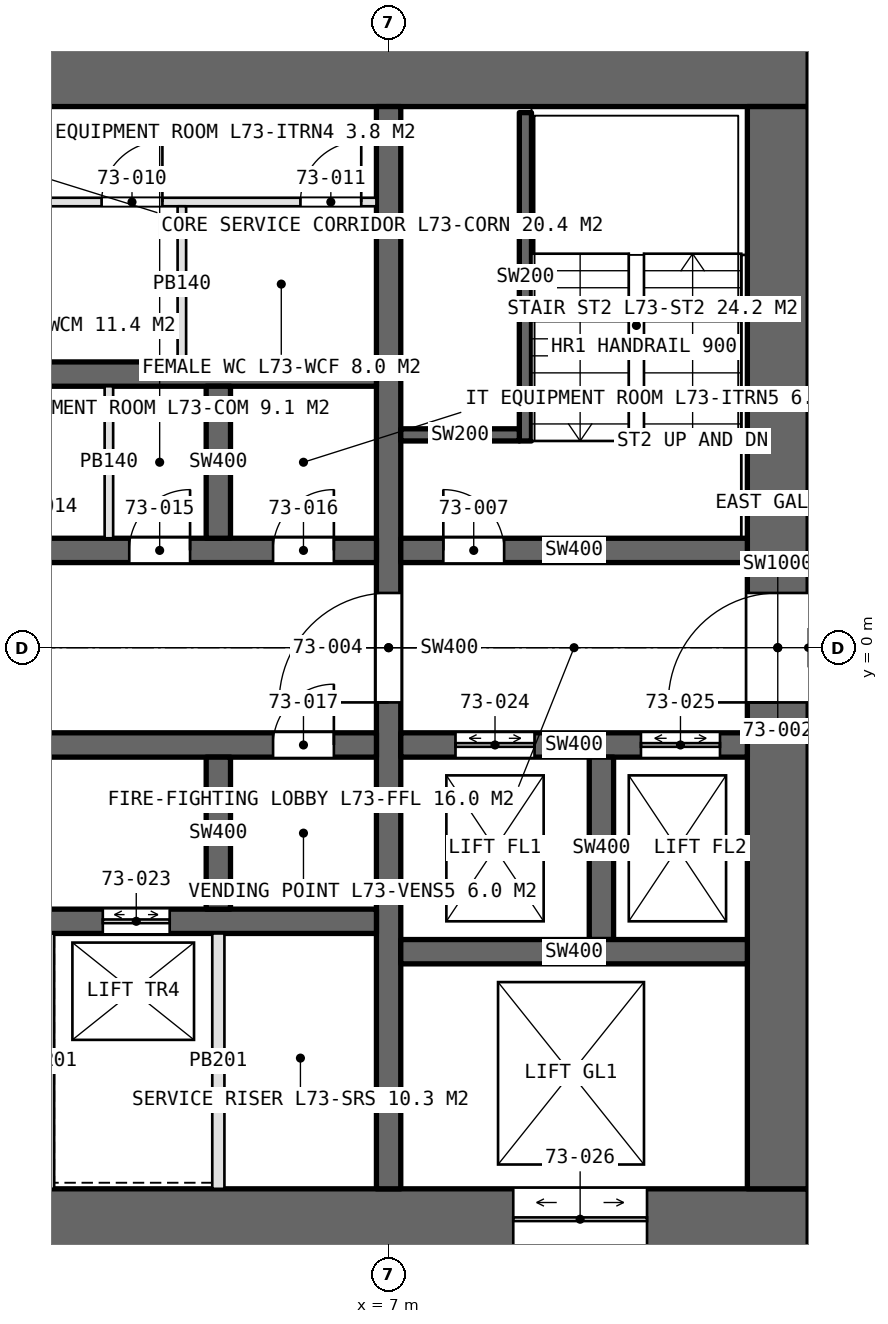
"""IFC4 building model, lengths in metres.
Left out: names, types, materials, properties, quantities, classifications, styles, units other than length and angle.
Written with IfcOpenShell. Run it as: python <this file> out.ifc"""

import sys

from ifc_helpers import new_model, si_unit, direction, frame, frame_2d, origin, place, context, subcontext, project, spatial, rectangle, extrude, element, fill, save


model = new_model("IFC4")
c1 = context("Model", 3, precision=1e-05, world=origin(), true_north=direction((0.0, 1.0)))
c2 = subcontext(c1, "Body", "Model", "MODEL_VIEW")
j1 = project(units=[si_unit("LENGTHUNIT", "METRE"), si_unit("PLANEANGLEUNIT", "RADIAN")], contexts=[c1])
p1 = place(None, origin())
s1 = spatial("IfcSite", under=j1, at=p1, CompositionType="ELEMENT")
p2 = place(p1, origin())
s2 = spatial("IfcBuilding", under=s1, at=p2, CompositionType="ELEMENT")
p3 = place(p2, frame((0.0, 0.0, 325.8)))
s3 = spatial("IfcBuildingStorey", under=s2, at=p3, CompositionType="ELEMENT", Elevation=325.8)
p4 = place(p3, frame((-13.9, -9.4, 0.0), z_axis=(0.0, 0.0, 1.0), x_axis=(1.0, 0.0, 0.0)))
e1 = element("IfcWall", 1, at=p4, inside=s3, PredefinedType="SHEAR", context=c2, shape_type="SweptSolid", body=[
    extrude(rectangle(XDim=27.8, YDim=1.0, at=frame_2d((13.9, 0.0))), origin(), (0.0, 0.0, 1.0), 4.2),
])
p5 = place(p4, frame((22.95, 0.0, 0.0)))
e2 = element("IfcOpeningElement", 2, at=p5, cuts=e1, PredefinedType="OPENING", context=c2, shape_type="SweptSolid", body=[
    extrude(rectangle(XDim=2.2, YDim=2.7, at=frame_2d((1.1, 1.35))), frame((0.0, 0.51, 0.0), z_axis=(0.0, -1.0, 0.0), x_axis=(1.0, 0.0, 0.0)), (0.0, 0.0, 1.0), 1.02),
])
p6 = place(p3, frame((13.9, 9.4, 0.0), z_axis=(0.0, 0.0, 1.0), x_axis=(-1.0, 0.0, 0.0)))
e3 = element("IfcWall", 3, at=p6, inside=s3, PredefinedType="SHEAR", context=c2, shape_type="SweptSolid", body=[
    extrude(rectangle(XDim=27.8, YDim=1.0, at=frame_2d((13.9, 0.0))), origin(), (0.0, 0.0, 1.0), 4.2),
])
p7 = place(p6, frame((23.9, 0.0, 0.0)))
e4 = element("IfcOpeningElement", 4, at=p7, cuts=e3, PredefinedType="OPENING", context=c2, shape_type="SweptSolid", body=[
    extrude(rectangle(XDim=1.0, YDim=2.4, at=frame_2d((0.5, 1.2))), frame((0.0, 0.51, 0.0), z_axis=(0.0, -1.0, 0.0), x_axis=(1.0, 0.0, 0.0)), (0.0, 0.0, 1.0), 1.02),
])
p8 = place(p6, frame((13.0, 0.0, 0.0)))
e5 = element("IfcOpeningElement", 5, at=p8, cuts=e3, PredefinedType="OPENING", context=c2, shape_type="SweptSolid", body=[
    extrude(rectangle(XDim=1.8, YDim=2.4, at=frame_2d((0.9, 1.2))), frame((0.0, 0.51, 0.0), z_axis=(0.0, -1.0, 0.0), x_axis=(1.0, 0.0, 0.0)), (0.0, 0.0, 1.0), 1.02),
])
p9 = place(p3, frame((13.4, -8.9, 0.0), z_axis=(0.0, 0.0, 1.0), x_axis=(0.0, 1.0, 0.0)))
e6 = element("IfcWall", 6, at=p9, inside=s3, PredefinedType="SHEAR", context=c2, shape_type="SweptSolid", body=[
    extrude(rectangle(XDim=17.8, YDim=1.0, at=frame_2d((8.9, 0.0))), origin(), (0.0, 0.0, 1.0), 4.2),
])
p10 = place(p9, frame((8.0, 0.0, 0.0)))
e7 = element("IfcOpeningElement", 7, at=p10, cuts=e6, PredefinedType="OPENING", context=c2, shape_type="SweptSolid", body=[
    extrude(rectangle(XDim=1.8, YDim=2.4, at=frame_2d((0.9, 1.2))), frame((0.0, 0.51, 0.0), z_axis=(0.0, -1.0, 0.0), x_axis=(1.0, 0.0, 0.0)), (0.0, 0.0, 1.0), 1.02),
])
p11 = place(p3, frame((7.0, -8.9, 0.0), z_axis=(0.0, 0.0, 1.0), x_axis=(0.0, 1.0, 0.0)))
e8 = element("IfcWall", 8, at=p11, inside=s3, PredefinedType="SHEAR", context=c2, shape_type="SweptSolid", body=[
    extrude(rectangle(XDim=17.8, YDim=0.4, at=frame_2d((8.9, 0.0))), origin(), (0.0, 0.0, 1.0), 4.2),
])
p12 = place(p11, frame((8.0, 0.0, 0.0)))
e9 = element("IfcOpeningElement", 9, at=p12, cuts=e8, PredefinedType="OPENING", context=c2, shape_type="SweptSolid", body=[
    extrude(rectangle(XDim=1.8, YDim=2.4, at=frame_2d((0.9, 1.2))), frame((0.0, 0.21, 0.0), z_axis=(0.0, -1.0, 0.0), x_axis=(1.0, 0.0, 0.0)), (0.0, 0.0, 1.0), 0.42),
])
p13 = place(p3, frame((-6.8, 1.6, 0.0), z_axis=(0.0, 0.0, 1.0), x_axis=(1.0, 0.0, 0.0)))
e10 = element("IfcWall", 10, at=p13, inside=s3, PredefinedType="SHEAR", context=c2, shape_type="SweptSolid", body=[
    extrude(rectangle(XDim=13.6, YDim=0.4, at=frame_2d((6.8, 0.0))), origin(), (0.0, 0.0, 1.0), 4.2),
])
p14 = place(p13, frame((0.365, 0.0, 0.0)))
e11 = element("IfcOpeningElement", 11, at=p14, cuts=e10, PredefinedType="OPENING", context=c2, shape_type="SweptSolid", body=[
    extrude(rectangle(XDim=1.0, YDim=2.4, at=frame_2d((0.5, 1.2))), frame((0.0, 0.21, 0.0), z_axis=(0.0, -1.0, 0.0), x_axis=(1.0, 0.0, 0.0)), (0.0, 0.0, 1.0), 0.42),
])
p15 = place(p13, frame((3.2, 0.0, 0.0)))
e12 = element("IfcOpeningElement", 12, at=p15, cuts=e10, PredefinedType="OPENING", context=c2, shape_type="SweptSolid", body=[
    extrude(rectangle(XDim=1.0, YDim=2.4, at=frame_2d((0.5, 1.2))), frame((0.0, 0.21, 0.0), z_axis=(0.0, -1.0, 0.0), x_axis=(1.0, 0.0, 0.0)), (0.0, 0.0, 1.0), 0.42),
])
p16 = place(p13, frame((6.9, 0.0, 0.0)))
e13 = element("IfcOpeningElement", 13, at=p16, cuts=e10, PredefinedType="OPENING", context=c2, shape_type="SweptSolid", body=[
    extrude(rectangle(XDim=1.0, YDim=2.4, at=frame_2d((0.5, 1.2))), frame((0.0, 0.21, 0.0), z_axis=(0.0, -1.0, 0.0), x_axis=(1.0, 0.0, 0.0)), (0.0, 0.0, 1.0), 0.42),
])
p17 = place(p13, frame((9.535, 0.0, 0.0)))
e14 = element("IfcOpeningElement", 14, at=p17, cuts=e10, PredefinedType="OPENING", context=c2, shape_type="SweptSolid", body=[
    extrude(rectangle(XDim=1.0, YDim=2.4, at=frame_2d((0.5, 1.2))), frame((0.0, 0.21, 0.0), z_axis=(0.0, -1.0, 0.0), x_axis=(1.0, 0.0, 0.0)), (0.0, 0.0, 1.0), 0.42),
])
p18 = place(p13, frame((11.9, 0.0, 0.0)))
e15 = element("IfcOpeningElement", 15, at=p18, cuts=e10, PredefinedType="OPENING", context=c2, shape_type="SweptSolid", body=[
    extrude(rectangle(XDim=1.0, YDim=2.4, at=frame_2d((0.5, 1.2))), frame((0.0, 0.21, 0.0), z_axis=(0.0, -1.0, 0.0), x_axis=(1.0, 0.0, 0.0)), (0.0, 0.0, 1.0), 0.42),
])
p19 = place(p3, frame((-6.8, -1.6, 0.0), z_axis=(0.0, 0.0, 1.0), x_axis=(1.0, 0.0, 0.0)))
e16 = element("IfcWall", 16, at=p19, inside=s3, PredefinedType="SHEAR", context=c2, shape_type="SweptSolid", body=[
    extrude(rectangle(XDim=13.6, YDim=0.4, at=frame_2d((6.8, 0.0))), origin(), (0.0, 0.0, 1.0), 4.2),
])
p20 = place(p19, frame((11.9, 0.0, 0.0)))
e17 = element("IfcOpeningElement", 17, at=p20, cuts=e16, PredefinedType="OPENING", context=c2, shape_type="SweptSolid", body=[
    extrude(rectangle(XDim=1.0, YDim=2.4, at=frame_2d((0.5, 1.2))), frame((0.0, 0.21, 0.0), z_axis=(0.0, -1.0, 0.0), x_axis=(1.0, 0.0, 0.0)), (0.0, 0.0, 1.0), 0.42),
])
p21 = place(p19, frame((4.5, 0.0, 0.0)))
e18 = element("IfcOpeningElement", 18, at=p21, cuts=e16, PredefinedType="OPENING", context=c2, shape_type="SweptSolid", body=[
    extrude(rectangle(XDim=1.8, YDim=2.4, at=frame_2d((0.9, 1.2))), frame((0.0, 0.21, 0.0), z_axis=(0.0, -1.0, 0.0), x_axis=(1.0, 0.0, 0.0)), (0.0, 0.0, 1.0), 0.42),
])
p22 = place(p3, frame((-6.8, 4.5, 0.0), z_axis=(0.0, 0.0, 1.0), x_axis=(1.0, 0.0, 0.0)))
e19 = element("IfcWall", 19, at=p22, inside=s3, PredefinedType="SHEAR", context=c2, shape_type="SweptSolid", body=[
    extrude(rectangle(XDim=13.6, YDim=0.4, at=frame_2d((6.8, 0.0))), origin(), (0.0, 0.0, 1.0), 4.2),
])
p23 = place(p3, frame((-6.8, -4.5, 0.0), z_axis=(0.0, 0.0, 1.0), x_axis=(1.0, 0.0, 0.0)))
e20 = element("IfcWall", 20, at=p23, inside=s3, PredefinedType="SHEAR", context=c2, shape_type="SweptSolid", body=[
    extrude(rectangle(XDim=13.6, YDim=0.4, at=frame_2d((6.8, 0.0))), origin(), (0.0, 0.0, 1.0), 4.2),
])
p24 = place(p23, frame((0.7, 0.0, 0.0)))
e21 = element("IfcOpeningElement", 21, at=p24, cuts=e20, PredefinedType="OPENING", context=c2, shape_type="SweptSolid", body=[
    extrude(rectangle(XDim=1.1, YDim=2.4, at=frame_2d((0.55, 1.2))), frame((0.0, 0.21, 0.0), z_axis=(0.0, -1.0, 0.0), x_axis=(1.0, 0.0, 0.0)), (0.0, 0.0, 1.0), 0.42),
])
p25 = place(p23, frame((3.5, 0.0, 0.0)))
e22 = element("IfcOpeningElement", 22, at=p25, cuts=e20, PredefinedType="OPENING", context=c2, shape_type="SweptSolid", body=[
    extrude(rectangle(XDim=1.1, YDim=2.4, at=frame_2d((0.55, 1.2))), frame((0.0, 0.21, 0.0), z_axis=(0.0, -1.0, 0.0), x_axis=(1.0, 0.0, 0.0)), (0.0, 0.0, 1.0), 0.42),
])
p26 = place(p23, frame((6.3, 0.0, 0.0)))
e23 = element("IfcOpeningElement", 23, at=p26, cuts=e20, PredefinedType="OPENING", context=c2, shape_type="SweptSolid", body=[
    extrude(rectangle(XDim=1.1, YDim=2.4, at=frame_2d((0.55, 1.2))), frame((0.0, 0.21, 0.0), z_axis=(0.0, -1.0, 0.0), x_axis=(1.0, 0.0, 0.0)), (0.0, 0.0, 1.0), 0.42),
])
p27 = place(p23, frame((9.1, 0.0, 0.0)))
e24 = element("IfcOpeningElement", 24, at=p27, cuts=e20, PredefinedType="OPENING", context=c2, shape_type="SweptSolid", body=[
    extrude(rectangle(XDim=1.1, YDim=2.4, at=frame_2d((0.55, 1.2))), frame((0.0, 0.21, 0.0), z_axis=(0.0, -1.0, 0.0), x_axis=(1.0, 0.0, 0.0)), (0.0, 0.0, 1.0), 0.42),
])
p28 = place(p3, frame((7.2, 1.6, 0.0), z_axis=(0.0, 0.0, 1.0), x_axis=(1.0, 0.0, 0.0)))
e25 = element("IfcWall", 25, at=p28, inside=s3, PredefinedType="SHEAR", context=c2, shape_type="SweptSolid", body=[
    extrude(rectangle(XDim=5.7, YDim=0.4, at=frame_2d((2.85, 0.0))), origin(), (0.0, 0.0, 1.0), 4.2),
])
p29 = place(p28, frame((0.7, 0.0, 0.0)))
e26 = element("IfcOpeningElement", 26, at=p29, cuts=e25, PredefinedType="OPENING", context=c2, shape_type="SweptSolid", body=[
    extrude(rectangle(XDim=1.0, YDim=2.4, at=frame_2d((0.5, 1.2))), frame((0.0, 0.21, 0.0), z_axis=(0.0, -1.0, 0.0), x_axis=(1.0, 0.0, 0.0)), (0.0, 0.0, 1.0), 0.42),
])
p30 = place(p3, frame((7.2, -1.6, 0.0), z_axis=(0.0, 0.0, 1.0), x_axis=(1.0, 0.0, 0.0)))
e27 = element("IfcWall", 27, at=p30, inside=s3, PredefinedType="SHEAR", context=c2, shape_type="SweptSolid", body=[
    extrude(rectangle(XDim=5.7, YDim=0.4, at=frame_2d((2.85, 0.0))), origin(), (0.0, 0.0, 1.0), 4.2),
])
p31 = place(p30, frame((0.9, 0.0, 0.0)))
e28 = element("IfcOpeningElement", 28, at=p31, cuts=e27, PredefinedType="OPENING", context=c2, shape_type="SweptSolid", body=[
    extrude(rectangle(XDim=1.3, YDim=2.4, at=frame_2d((0.65, 1.2))), frame((0.0, 0.21, 0.0), z_axis=(0.0, -1.0, 0.0), x_axis=(1.0, 0.0, 0.0)), (0.0, 0.0, 1.0), 0.42),
])
p32 = place(p30, frame((3.95, 0.0, 0.0)))
e29 = element("IfcOpeningElement", 29, at=p32, cuts=e27, PredefinedType="OPENING", context=c2, shape_type="SweptSolid", body=[
    extrude(rectangle(XDim=1.3, YDim=2.4, at=frame_2d((0.65, 1.2))), frame((0.0, 0.21, 0.0), z_axis=(0.0, -1.0, 0.0), x_axis=(1.0, 0.0, 0.0)), (0.0, 0.0, 1.0), 0.42),
])
p33 = place(p3, frame((10.5, -4.8, 0.0), z_axis=(0.0, 0.0, 1.0), x_axis=(0.0, 1.0, 0.0)))
e30 = element("IfcWall", 30, at=p33, inside=s3, PredefinedType="SHEAR", context=c2, shape_type="SweptSolid", body=[
    extrude(rectangle(XDim=3.0, YDim=0.4, at=frame_2d((1.5, 0.0))), origin(), (0.0, 0.0, 1.0), 4.2),
])
p34 = place(p3, frame((7.2, -5.0, 0.0), z_axis=(0.0, 0.0, 1.0), x_axis=(1.0, 0.0, 0.0)))
e31 = element("IfcWall", 31, at=p34, inside=s3, PredefinedType="SHEAR", context=c2, shape_type="SweptSolid", body=[
    extrude(rectangle(XDim=5.7, YDim=0.4, at=frame_2d((2.85, 0.0))), origin(), (0.0, 0.0, 1.0), 4.2),
])
for number, where, z_axis, x_axis in (
    (32, (4.2, 1.8, 0.0), (0.0, 0.0, 1.0), (0.0, 1.0, 0.0)),
    (33, (4.2, -4.3, 0.0), (0.0, 0.0, 1.0), (0.0, 1.0, 0.0)),
):
    element("IfcWall", number, at=place(p3, frame(where, z_axis=z_axis, x_axis=x_axis)), inside=s3, PredefinedType="SHEAR", context=c2, shape_type="SweptSolid", body=[
        extrude(rectangle(XDim=2.5, YDim=0.4, at=frame_2d((1.25, 0.0))), origin(), (0.0, 0.0, 1.0), 4.2),
    ])
p35 = place(p3, frame((-6.8, 7.33, 0.0), z_axis=(0.0, 0.0, 1.0), x_axis=(1.0, 0.0, 0.0)))
e34 = element("IfcWall", 34, at=p35, inside=s3, PredefinedType="PARTITIONING", context=c2, shape_type="SweptSolid", body=[
    extrude(rectangle(XDim=13.6, YDim=0.14, at=frame_2d((6.8, 0.0))), origin(), (0.0, 0.0, 1.0), 3.95),
])
p36 = place(p35, frame((0.58, 0.0, 0.0)))
e35 = element("IfcOpeningElement", 35, at=p36, cuts=e34, PredefinedType="OPENING", context=c2, shape_type="SweptSolid", body=[
    extrude(rectangle(XDim=0.9, YDim=2.4, at=frame_2d((0.45, 1.2))), frame((0.0, 0.08, 0.0), z_axis=(0.0, -1.0, 0.0), x_axis=(1.0, 0.0, 0.0)), (0.0, 0.0, 1.0), 0.16),
])
p37 = place(p35, frame((4.38, 0.0, 0.0)))
e36 = element("IfcOpeningElement", 36, at=p37, cuts=e34, PredefinedType="OPENING", context=c2, shape_type="SweptSolid", body=[
    extrude(rectangle(XDim=1.1, YDim=2.4, at=frame_2d((0.55, 1.2))), frame((0.0, 0.08, 0.0), z_axis=(0.0, -1.0, 0.0), x_axis=(1.0, 0.0, 0.0)), (0.0, 0.0, 1.0), 0.16),
])
p38 = place(p35, frame((9.08, 0.0, 0.0)))
e37 = element("IfcOpeningElement", 37, at=p38, cuts=e34, PredefinedType="OPENING", context=c2, shape_type="SweptSolid", body=[
    extrude(rectangle(XDim=1.0, YDim=2.4, at=frame_2d((0.5, 1.2))), frame((0.0, 0.08, 0.0), z_axis=(0.0, -1.0, 0.0), x_axis=(1.0, 0.0, 0.0)), (0.0, 0.0, 1.0), 0.16),
])
p39 = place(p35, frame((12.35, 0.0, 0.0)))
e38 = element("IfcOpeningElement", 38, at=p39, cuts=e34, PredefinedType="OPENING", context=c2, shape_type="SweptSolid", body=[
    extrude(rectangle(XDim=1.0, YDim=2.4, at=frame_2d((0.5, 1.2))), frame((0.0, 0.08, 0.0), z_axis=(0.0, -1.0, 0.0), x_axis=(1.0, 0.0, 0.0)), (0.0, 0.0, 1.0), 0.16),
])
p40 = place(p3, frame((3.6, 4.7, 0.0), z_axis=(0.0, 0.0, 1.0), x_axis=(0.0, 1.0, 0.0)))
e39 = element("IfcWall", 39, at=p40, inside=s3, PredefinedType="PARTITIONING", context=c2, shape_type="SweptSolid", body=[
    extrude(rectangle(XDim=2.56, YDim=0.14, at=frame_2d((1.28, 0.0))), origin(), (0.0, 0.0, 1.0), 3.95),
])
p41 = place(p3, frame((2.4, 1.8, 0.0), z_axis=(0.0, 0.0, 1.0), x_axis=(0.0, 1.0, 0.0)))
e40 = element("IfcWall", 40, at=p41, inside=s3, PredefinedType="PARTITIONING", context=c2, shape_type="SweptSolid", body=[
    extrude(rectangle(XDim=2.5, YDim=0.14, at=frame_2d((1.25, 0.0))), origin(), (0.0, 0.0, 1.0), 3.95),
])
for number, where, z_axis, x_axis in (
    (41, (1.4, -4.7, 0.0), (0.0, 0.0, 1.0), (0.0, -1.0, 0.0)),
    (42, (4.2, -4.7, 0.0), (0.0, 0.0, 1.0), (0.0, -1.0, 0.0)),
):
    element("IfcWall", number, at=place(p3, frame(where, z_axis=z_axis, x_axis=x_axis)), inside=s3, PredefinedType="PARTITIONING", context=c2, shape_type="SweptSolid", body=[
        extrude(rectangle(XDim=4.2, YDim=0.2, at=frame_2d((2.1, 0.0))), origin(), (0.0, 0.0, 1.0), 4.2),
    ])
p42 = place(p3, frame((9.25, 3.4, 0.0), z_axis=(0.0, 0.0, 1.0), x_axis=(0.0, 1.0, 0.0)))
e43 = element("IfcWall", 43, at=p42, inside=s3, PredefinedType="SOLIDWALL", context=c2, shape_type="SweptSolid", body=[
    extrude(rectangle(XDim=5.4, YDim=0.2, at=frame_2d((2.7, 0.0))), origin(), (0.0, 0.0, 1.0), 4.2),
])
p43 = place(p3, frame((9.15, 3.5, 0.0), z_axis=(0.0, 0.0, 1.0), x_axis=(-1.0, 0.0, 0.0)))
e44 = element("IfcWall", 44, at=p43, inside=s3, PredefinedType="SOLIDWALL", context=c2, shape_type="SweptSolid", body=[
    extrude(rectangle(XDim=1.95, YDim=0.2, at=frame_2d((0.975, 0.0))), origin(), (0.0, 0.0, 1.0), 4.2),
])
p44 = place(p10, origin())
e45 = element("IfcDoor", 45, at=p44, inside=s3, OperationType="DOUBLE_DOOR_SINGLE_SWING", PredefinedType="DOOR", context=c2, shape_type="SweptSolid", body=[
    extrude(rectangle(XDim=1.8, YDim=2.4, at=frame_2d((0.9, 1.2))), frame((0.0, 0.025, 0.0), z_axis=(0.0, -1.0, 0.0), x_axis=(1.0, 0.0, 0.0)), (0.0, 0.0, 1.0), 0.05),
])
fill(e7, e45)
p45 = place(p12, origin())
e46 = element("IfcDoor", 46, at=p45, inside=s3, OperationType="DOUBLE_DOOR_SINGLE_SWING", PredefinedType="DOOR", context=c2, shape_type="SweptSolid", body=[
    extrude(rectangle(XDim=1.8, YDim=2.4, at=frame_2d((0.9, 1.2))), frame((0.0, 0.025, 0.0), z_axis=(0.0, -1.0, 0.0), x_axis=(1.0, 0.0, 0.0)), (0.0, 0.0, 1.0), 0.05),
])
fill(e9, e46)
p46 = place(p29, origin())
e47 = element("IfcDoor", 47, at=p46, inside=s3, OperationType="SINGLE_SWING_LEFT", PredefinedType="DOOR", context=c2, shape_type="SweptSolid", body=[
    extrude(rectangle(XDim=1.0, YDim=2.4, at=frame_2d((0.5, 1.2))), frame((0.0, 0.025, 0.0), z_axis=(0.0, -1.0, 0.0), x_axis=(1.0, 0.0, 0.0)), (0.0, 0.0, 1.0), 0.05),
])
fill(e26, e47)
p47 = place(p38, origin())
e48 = element("IfcDoor", 48, at=p47, inside=s3, OperationType="SINGLE_SWING_RIGHT", PredefinedType="DOOR", context=c2, shape_type="SweptSolid", body=[
    extrude(rectangle(XDim=1.0, YDim=2.4, at=frame_2d((0.5, 1.2))), frame((0.0, 0.025, 0.0), z_axis=(0.0, -1.0, 0.0), x_axis=(1.0, 0.0, 0.0)), (0.0, 0.0, 1.0), 0.05),
])
fill(e37, e48)
p48 = place(p39, origin())
e49 = element("IfcDoor", 49, at=p48, inside=s3, OperationType="SINGLE_SWING_RIGHT", PredefinedType="DOOR", context=c2, shape_type="SweptSolid", body=[
    extrude(rectangle(XDim=1.0, YDim=2.4, at=frame_2d((0.5, 1.2))), frame((0.0, 0.025, 0.0), z_axis=(0.0, -1.0, 0.0), x_axis=(1.0, 0.0, 0.0)), (0.0, 0.0, 1.0), 0.05),
])
fill(e38, e49)
p49 = place(p17, origin())
e50 = element("IfcDoor", 50, at=p49, inside=s3, OperationType="SINGLE_SWING_RIGHT", PredefinedType="DOOR", context=c2, shape_type="SweptSolid", body=[
    extrude(rectangle(XDim=1.0, YDim=2.4, at=frame_2d((0.5, 1.2))), frame((0.0, 0.025, 0.0), z_axis=(0.0, -1.0, 0.0), x_axis=(1.0, 0.0, 0.0)), (0.0, 0.0, 1.0), 0.05),
])
fill(e14, e50)
p50 = place(p18, origin())
e51 = element("IfcDoor", 51, at=p50, inside=s3, OperationType="SINGLE_SWING_RIGHT", PredefinedType="DOOR", context=c2, shape_type="SweptSolid", body=[
    extrude(rectangle(XDim=1.0, YDim=2.4, at=frame_2d((0.5, 1.2))), frame((0.0, 0.025, 0.0), z_axis=(0.0, -1.0, 0.0), x_axis=(1.0, 0.0, 0.0)), (0.0, 0.0, 1.0), 0.05),
])
fill(e15, e51)
p51 = place(p20, origin())
e52 = element("IfcDoor", 52, at=p51, inside=s3, OperationType="SINGLE_SWING_RIGHT", PredefinedType="DOOR", context=c2, shape_type="SweptSolid", body=[
    extrude(rectangle(XDim=1.0, YDim=2.4, at=frame_2d((0.5, 1.2))), frame((0.0, 0.025, 0.0), z_axis=(0.0, -1.0, 0.0), x_axis=(1.0, 0.0, 0.0)), (0.0, 0.0, 1.0), 0.05),
])
fill(e17, e52)
p52 = place(p27, origin())
e53 = element("IfcDoor", 53, at=p52, inside=s3, OperationType="DOUBLE_DOOR_SLIDING", PredefinedType="DOOR", context=c2, shape_type="SweptSolid", body=[
    extrude(rectangle(XDim=1.1, YDim=2.4, at=frame_2d((0.55, 1.2))), frame((0.0, 0.025, 0.0), z_axis=(0.0, -1.0, 0.0), x_axis=(1.0, 0.0, 0.0)), (0.0, 0.0, 1.0), 0.05),
])
fill(e24, e53)
p53 = place(p31, origin())
e54 = element("IfcDoor", 54, at=p53, inside=s3, OperationType="DOUBLE_DOOR_SLIDING", PredefinedType="DOOR", context=c2, shape_type="SweptSolid", body=[
    extrude(rectangle(XDim=1.3, YDim=2.4, at=frame_2d((0.65, 1.2))), frame((0.0, 0.025, 0.0), z_axis=(0.0, -1.0, 0.0), x_axis=(1.0, 0.0, 0.0)), (0.0, 0.0, 1.0), 0.05),
])
fill(e28, e54)
p54 = place(p32, origin())
e55 = element("IfcDoor", 55, at=p54, inside=s3, OperationType="DOUBLE_DOOR_SLIDING", PredefinedType="DOOR", context=c2, shape_type="SweptSolid", body=[
    extrude(rectangle(XDim=1.3, YDim=2.4, at=frame_2d((0.65, 1.2))), frame((0.0, 0.025, 0.0), z_axis=(0.0, -1.0, 0.0), x_axis=(1.0, 0.0, 0.0)), (0.0, 0.0, 1.0), 0.05),
])
fill(e29, e55)
p55 = place(p5, origin())
e56 = element("IfcDoor", 56, at=p55, inside=s3, OperationType="DOUBLE_DOOR_SLIDING", PredefinedType="DOOR", context=c2, shape_type="SweptSolid", body=[
    extrude(rectangle(XDim=2.2, YDim=2.7, at=frame_2d((1.1, 1.35))), frame((0.0, 0.025, 0.0), z_axis=(0.0, -1.0, 0.0), x_axis=(1.0, 0.0, 0.0)), (0.0, 0.0, 1.0), 0.05),
])
fill(e2, e56)
save(model, sys.argv[1])
